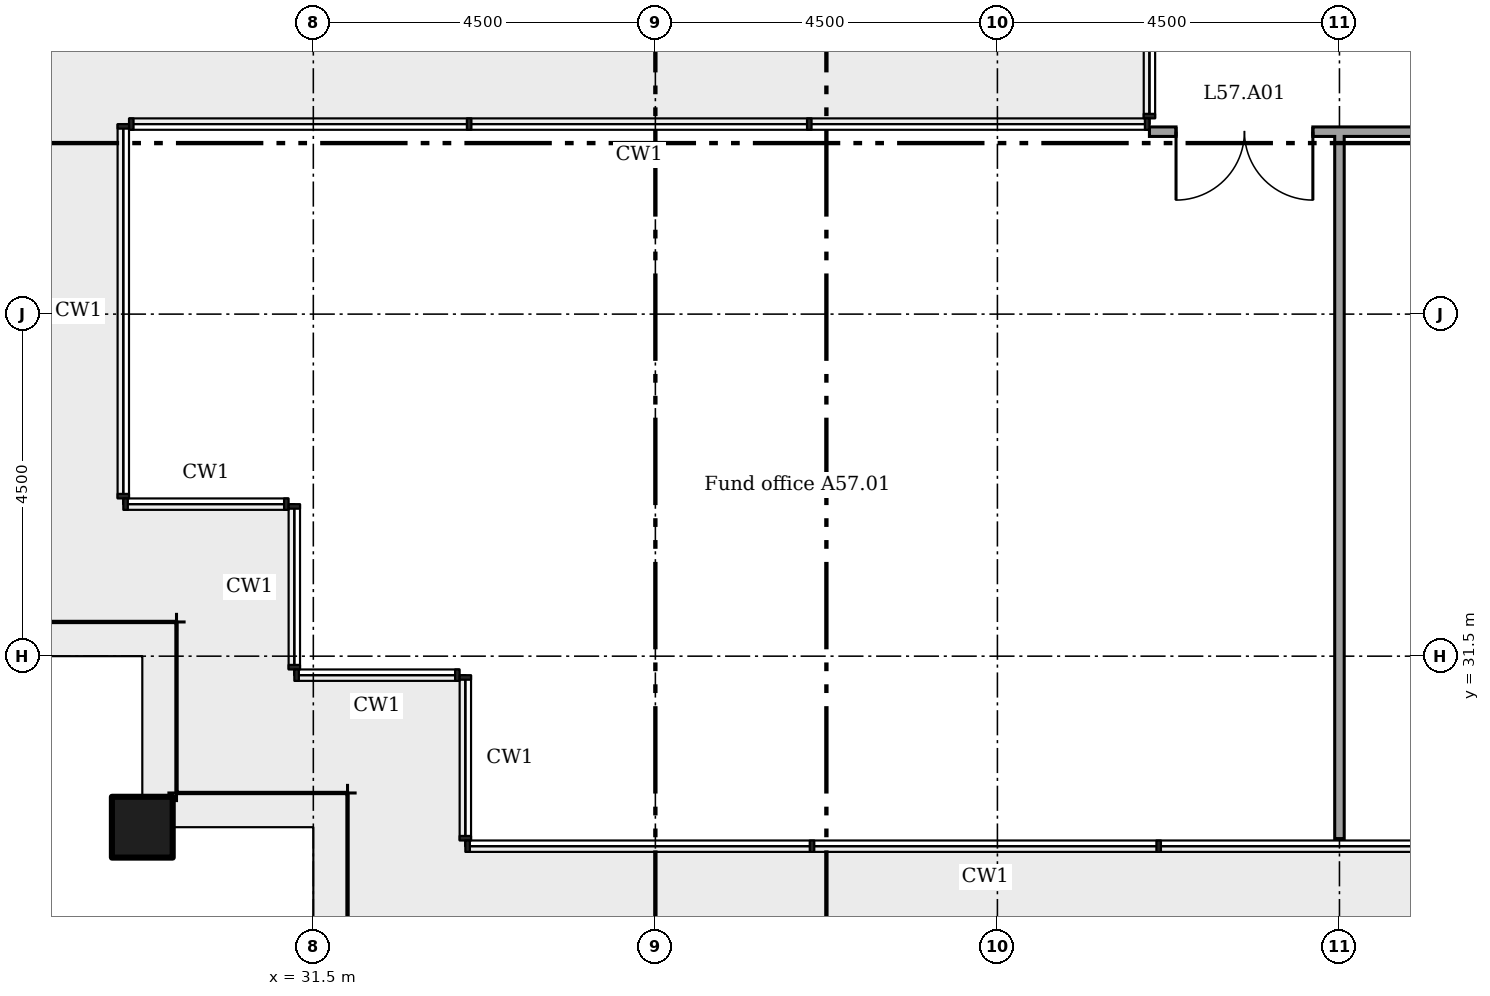
"""IFC4 building model, lengths in metres.
Left out: names, types, materials, properties, quantities, classifications, styles, units other than length and angle.
Written with IfcOpenShell. Run it as: python <this file> out.ifc"""

import sys

from ifc_helpers import new_model, si_unit, direction, frame, frame_2d, origin, origin_2d, place, context, subcontext, project, spatial, rectangle, extrude, element, fill, save


model = new_model("IFC4")
c1 = context("Model", 3, precision=1e-05, world=origin(), true_north=direction((0.0, 1.0)))
c2 = subcontext(c1, "Body", "Model", "MODEL_VIEW")
j1 = project(units=[si_unit("LENGTHUNIT", "METRE"), si_unit("PLANEANGLEUNIT", "RADIAN")], contexts=[c1])
p1 = place(None, origin())
s1 = spatial("IfcSite", under=j1, at=p1, CompositionType="ELEMENT")
p2 = place(p1, origin())
s2 = spatial("IfcBuilding", under=s1, at=p2, CompositionType="ELEMENT")
p3 = place(p2, frame((0.0, 0.0, 224.4)))
s3 = spatial("IfcBuildingStorey", under=s2, at=p3, CompositionType="ELEMENT", Elevation=224.4)
p4 = place(p3, frame((29.25, 29.25, 0.0)))
e1 = element("IfcColumn", 1, at=p4, inside=s3, PredefinedType="COLUMN", context=c2, shape_type="SweptSolid", body=[
    extrude(rectangle(XDim=0.8, YDim=0.8, at=origin_2d()), origin(), (0.0, 0.0, 1.0), 3.6),
])
p5 = place(p3, frame((42.5, 38.4, 0.0)))
e2 = element("IfcWall", 2, at=p5, inside=s3, PredefinedType="PARTITIONING", context=c2, shape_type="SweptSolid", body=[
    extrude(rectangle(XDim=18.462, YDim=0.125, at=frame_2d((9.231, 0.0))), origin(), (0.0, 0.0, 1.0), 3.45),
])
p6 = place(p5, frame((0.35, 0.0, 0.0)))
e3 = element("IfcOpeningElement", 3, at=p6, cuts=e2, PredefinedType="OPENING", context=c2, shape_type="SweptSolid", body=[
    extrude(rectangle(XDim=1.8, YDim=2.1, at=frame_2d((0.9, 1.05))), frame((0.0, 0.073, 0.0), z_axis=(0.0, -1.0, 0.0), x_axis=(1.0, 0.0, 0.0)), (0.0, 0.0, 1.0), 0.145),
])
p7 = place(p5, frame((5.258, 0.0, 0.0)))
e4 = element("IfcOpeningElement", 4, at=p7, cuts=e2, PredefinedType="OPENING", context=c2, shape_type="SweptSolid", body=[
    extrude(rectangle(XDim=1.0, YDim=2.1, at=frame_2d((0.5, 1.05))), frame((0.0, 0.073, 0.0), z_axis=(0.0, -1.0, 0.0), x_axis=(1.0, 0.0, 0.0)), (0.0, 0.0, 1.0), 0.145),
])
p8 = place(p5, frame((13.705, 0.0, 0.0)))
e5 = element("IfcOpeningElement", 5, at=p8, cuts=e2, PredefinedType="OPENING", context=c2, shape_type="SweptSolid", body=[
    extrude(rectangle(XDim=1.0, YDim=2.1, at=frame_2d((0.5, 1.05))), frame((0.0, 0.073, 0.0), z_axis=(0.0, -1.0, 0.0), x_axis=(1.0, 0.0, 0.0)), (0.0, 0.0, 1.0), 0.145),
])
p9 = place(p5, frame((16.7, 0.0, 0.0)))
e6 = element("IfcOpeningElement", 6, at=p9, cuts=e2, PredefinedType="OPENING", context=c2, shape_type="SweptSolid", body=[
    extrude(rectangle(XDim=1.0, YDim=2.1, at=frame_2d((0.5, 1.05))), frame((0.0, 0.073, 0.0), z_axis=(0.0, -1.0, 0.0), x_axis=(1.0, 0.0, 0.0)), (0.0, 0.0, 1.0), 0.145),
])
p10 = place(p3, frame((45.0, 29.1, 0.0), z_axis=(0.0, 0.0, 1.0), x_axis=(0.0, 1.0, 0.0)))
e7 = element("IfcWall", 7, at=p10, inside=s3, PredefinedType="PARTITIONING", context=c2, shape_type="SweptSolid", body=[
    extrude(rectangle(XDim=9.3, YDim=0.125, at=frame_2d((4.65, 0.0))), origin(), (0.0, 0.0, 1.0), 2.772),
])
p11 = place(p6, frame((1.8, 0.0, 0.0), x_axis=(-1.0, 0.0, 0.0)))
e8 = element("IfcDoor", 8, at=p11, inside=s3, OperationType="DOUBLE_DOOR_SINGLE_SWING", PredefinedType="DOOR", context=c2, shape_type="SweptSolid", body=[
    extrude(rectangle(XDim=1.8, YDim=2.1, at=frame_2d((0.9, 1.05))), frame((0.0, 0.025, 0.0), z_axis=(0.0, -1.0, 0.0), x_axis=(1.0, 0.0, 0.0)), (0.0, 0.0, 1.0), 0.05),
])
fill(e3, e8)
save(model, sys.argv[1])
